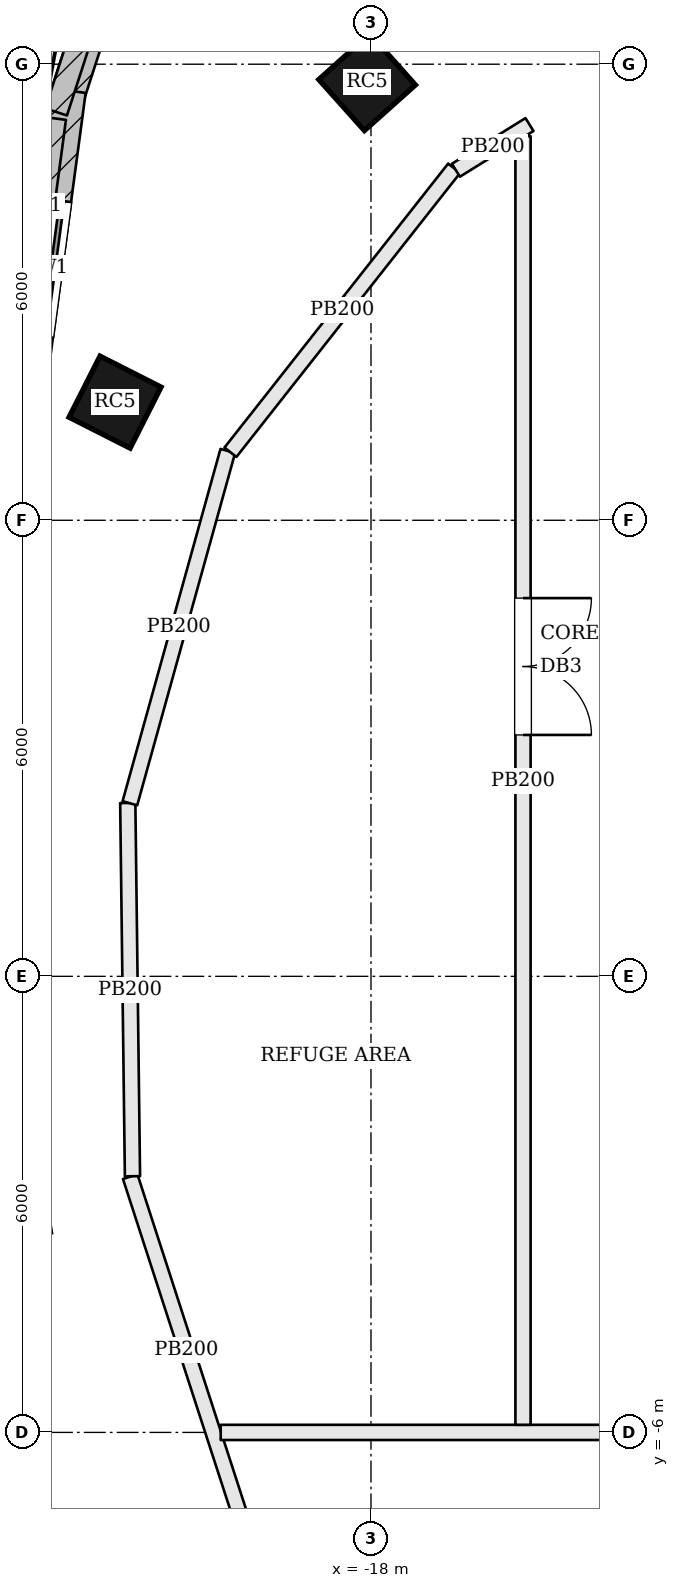
"""IFC4 building model, lengths in metres.
Left out: names, types, materials, properties, quantities, classifications, styles, units other than length and angle.
Written with IfcOpenShell. Run it as: python <this file> out.ifc"""

import sys

from ifc_helpers import new_model, si_unit, direction, frame, frame_2d, origin, origin_2d, place, context, subcontext, project, spatial, rectangle, extrude, element, fill, save


model = new_model("IFC4")
c1 = context("Model", 3, precision=1e-05, world=origin(), true_north=direction((0.0, 1.0)))
c2 = subcontext(c1, "Body", "Model", "MODEL_VIEW")
j1 = project(units=[si_unit("LENGTHUNIT", "METRE"), si_unit("PLANEANGLEUNIT", "RADIAN")], contexts=[c1])
p1 = place(None, origin())
s1 = spatial("IfcSite", under=j1, at=p1, CompositionType="ELEMENT")
p2 = place(p1, origin())
s2 = spatial("IfcBuilding", under=s1, at=p2, CompositionType="ELEMENT")
p3 = place(p2, frame((0.0, 0.0, 280.5)))
s3 = spatial("IfcBuildingStorey", under=s2, at=p3, CompositionType="ELEMENT", Elevation=280.5)
for number, where, z_axis, x_axis in (
    (1, (-18.051, 11.763, 0.0), (0.0, 0.0, 1.0), (-0.746, -0.666, 0.0)),
    (2, (-21.367, 7.554, 0.0), (0.0, 0.0, 1.0), (-0.452, -0.892, 0.0)),
):
    element("IfcColumn", number, at=place(p3, frame(where, z_axis=z_axis, x_axis=x_axis)), inside=s3, PredefinedType="COLUMN", context=c2, shape_type="SweptSolid", body=[
        extrude(rectangle(XDim=0.9, YDim=0.9, at=origin_2d()), origin(), (0.0, 0.0, 1.0), 3.9),
    ])
p4 = place(p3, frame((-20.819, 15.213, 0.0), z_axis=(0.0, 0.0, 1.0), x_axis=(-0.308282259578, -0.95129493241, 0.0)))
e3 = element("IfcWall", 3, at=p4, inside=s3, PredefinedType="SOLIDWALL", context=c2, shape_type="SweptSolid", body=[
    extrude(rectangle(XDim=3.785, YDim=0.45, at=frame_2d((1.892, 0.0))), origin(), (0.0, 0.0, 1.0), 3.7),
])
p5 = place(p4, frame((0.842, 0.0, 0.9)))
e4 = element("IfcOpeningElement", 4, at=p5, cuts=e3, PredefinedType="OPENING", context=c2, shape_type="SweptSolid", body=[
    extrude(rectangle(XDim=2.1, YDim=2.3, at=frame_2d((1.05, 1.15))), frame((0.0, 0.235, 0.0), z_axis=(0.0, -1.0, 0.0), x_axis=(1.0, 0.0, 0.0)), (0.0, 0.0, 1.0), 0.47),
])
p6 = place(p3, frame((-21.977, 11.652, 0.0), z_axis=(0.0, 0.0, 1.0), x_axis=(-0.132606175271, -0.991168806148, 0.0)))
e5 = element("IfcWall", 5, at=p6, inside=s3, PredefinedType="SOLIDWALL", context=c2, shape_type="SweptSolid", body=[
    extrude(rectangle(XDim=4.698, YDim=0.45, at=frame_2d((2.349, 0.0))), origin(), (0.0, 0.0, 1.0), 3.7),
])
p7 = place(p6, frame((1.449, 0.0, 0.9)))
e6 = element("IfcOpeningElement", 6, at=p7, cuts=e5, PredefinedType="OPENING", context=c2, shape_type="SweptSolid", body=[
    extrude(rectangle(XDim=1.8, YDim=2.3, at=frame_2d((0.9, 1.15))), frame((0.0, 0.235, 0.0), z_axis=(0.0, -1.0, 0.0), x_axis=(1.0, 0.0, 0.0)), (0.0, 0.0, 1.0), 0.47),
])
p8 = place(p3, frame((-20.928, 15.119, 3.9), z_axis=(0.0, 0.0, 1.0), x_axis=(-0.30831369753, -0.951284743868, 0.0)))
e7 = element("IfcWall", 7, at=p8, inside=s3, PredefinedType="PARAPET", context=c2, shape_type="SweptSolid", body=[
    extrude(rectangle(XDim=3.939, YDim=0.3, at=frame_2d((1.969, 0.0))), origin(), (0.0, 0.0, 1.0), 1.1),
])
p9 = place(p3, frame((-22.162, 11.288, 3.9), z_axis=(0.0, 0.0, 1.0), x_axis=(-0.132583148979, -0.991171886509, 0.0)))
e8 = element("IfcWall", 8, at=p9, inside=s3, PredefinedType="PARAPET", context=c2, shape_type="SweptSolid", body=[
    extrude(rectangle(XDim=2.326, YDim=0.3, at=frame_2d((1.163, 0.0))), origin(), (0.0, 0.0, 1.0), 1.1),
])
p10 = place(p3, frame((-19.689, -7.195, 0.0), z_axis=(0.0, 0.0, 1.0), x_axis=(-0.308517152125, 0.951218779695, 0.0)))
e9 = element("IfcWall", 9, at=p10, inside=s3, PredefinedType="PARTITIONING", context=c2, shape_type="SweptSolid", body=[
    extrude(rectangle(XDim=4.794, YDim=0.2, at=frame_2d((2.397, 0.0))), origin(), (0.0, 0.0, 1.0), 3.7),
])
p11 = place(p3, frame((-19.977, -6.0, 0.0), z_axis=(0.0, 0.0, 1.0), x_axis=(1.0, 0.0, 0.0)))
e10 = element("IfcWall", 10, at=p11, inside=s3, PredefinedType="PARTITIONING", context=c2, shape_type="SweptSolid", body=[
    extrude(rectangle(XDim=40.015, YDim=0.2, at=frame_2d((20.008, 0.0))), origin(), (0.0, 0.0, 1.0), 3.7),
])
p12 = place(p11, frame((19.077, 0.0, 0.0)))
e11 = element("IfcOpeningElement", 11, at=p12, cuts=e10, PredefinedType="OPENING", context=c2, shape_type="SweptSolid", body=[
    extrude(rectangle(XDim=1.8, YDim=2.1, at=frame_2d((0.9, 1.05))), frame((0.0, 0.11, 0.0), z_axis=(0.0, -1.0, 0.0), x_axis=(1.0, 0.0, 0.0)), (0.0, 0.0, 1.0), 0.22),
])
p13 = place(p3, frame((-21.138, -2.63, 0.0), z_axis=(0.0, 0.0, 1.0), x_axis=(-0.012626385888, 0.999920284012, 0.0)))
e12 = element("IfcWall", 12, at=p13, inside=s3, PredefinedType="PARTITIONING", context=c2, shape_type="SweptSolid", body=[
    extrude(rectangle(XDim=4.911, YDim=0.2, at=frame_2d((2.456, 0.0))), origin(), (0.0, 0.0, 1.0), 3.7),
])
p14 = place(p3, frame((-21.172, 2.277, 0.0), z_axis=(0.0, 0.0, 1.0), x_axis=(0.267756413289, 0.963486638798, 0.0)))
e13 = element("IfcWall", 13, at=p14, inside=s3, PredefinedType="PARTITIONING", context=c2, shape_type="SweptSolid", body=[
    extrude(rectangle(XDim=4.811, YDim=0.2, at=frame_2d((2.405, 0.0))), origin(), (0.0, 0.0, 1.0), 3.7),
])
p15 = place(p3, frame((-19.849, 6.895, 0.0), z_axis=(0.0, 0.0, 1.0), x_axis=(0.618811760178, 0.785539308669, 0.0)))
e14 = element("IfcWall", 14, at=p15, inside=s3, PredefinedType="PARTITIONING", context=c2, shape_type="SweptSolid", body=[
    extrude(rectangle(XDim=4.756, YDim=0.2, at=frame_2d((2.378, 0.0))), origin(), (0.0, 0.0, 1.0), 3.7),
])
p16 = place(p3, frame((-16.883, 10.605, 0.0), z_axis=(0.0, 0.0, 1.0), x_axis=(0.84954745962, 0.527512193085, 0.0)))
e15 = element("IfcWall", 15, at=p16, inside=s3, PredefinedType="PARTITIONING", context=c2, shape_type="SweptSolid", body=[
    extrude(rectangle(XDim=1.139, YDim=0.2, at=frame_2d((0.57, 0.0))), origin(), (0.0, 0.0, 1.0), 3.7),
])
p17 = place(p3, frame((-16.0, 11.053, 0.0), z_axis=(0.0, 0.0, 1.0), x_axis=(0.0, -1.0, 0.0)))
e16 = element("IfcWall", 16, at=p17, inside=s3, PredefinedType="PARTITIONING", context=c2, shape_type="SweptSolid", body=[
    extrude(rectangle(XDim=16.953, YDim=0.2, at=frame_2d((8.477, 0.0))), origin(), (0.0, 0.0, 1.0), 3.7),
])
p18 = place(p17, frame((6.077, 0.0, 0.0)))
e17 = element("IfcOpeningElement", 17, at=p18, cuts=e16, PredefinedType="OPENING", context=c2, shape_type="SweptSolid", body=[
    extrude(rectangle(XDim=1.8, YDim=2.1, at=frame_2d((0.9, 1.05))), frame((0.0, 0.11, 0.0), z_axis=(0.0, -1.0, 0.0), x_axis=(1.0, 0.0, 0.0)), (0.0, 0.0, 1.0), 0.22),
])
p19 = place(p7, origin())
e18 = element("IfcWindow", 18, at=p19, inside=s3, PartitioningType="SINGLE_PANEL", PredefinedType="WINDOW", context=c2, shape_type="SweptSolid", body=[
    extrude(rectangle(XDim=1.8, YDim=2.3, at=frame_2d((0.9, 1.15))), frame((0.0, 0.135, 0.0), z_axis=(0.0, -1.0, 0.0), x_axis=(1.0, 0.0, 0.0)), (0.0, 0.0, 1.0), 0.06),
])
fill(e6, e18)
p20 = place(p18, origin())
e19 = element("IfcDoor", 19, at=p20, inside=s3, OperationType="DOUBLE_DOOR_SINGLE_SWING", PredefinedType="DOOR", context=c2, shape_type="SweptSolid", body=[
    extrude(rectangle(XDim=1.8, YDim=2.1, at=frame_2d((0.9, 1.05))), frame((0.0, 0.025, 0.0), z_axis=(0.0, -1.0, 0.0), x_axis=(1.0, 0.0, 0.0)), (0.0, 0.0, 1.0), 0.05),
])
fill(e17, e19)
save(model, sys.argv[1])
